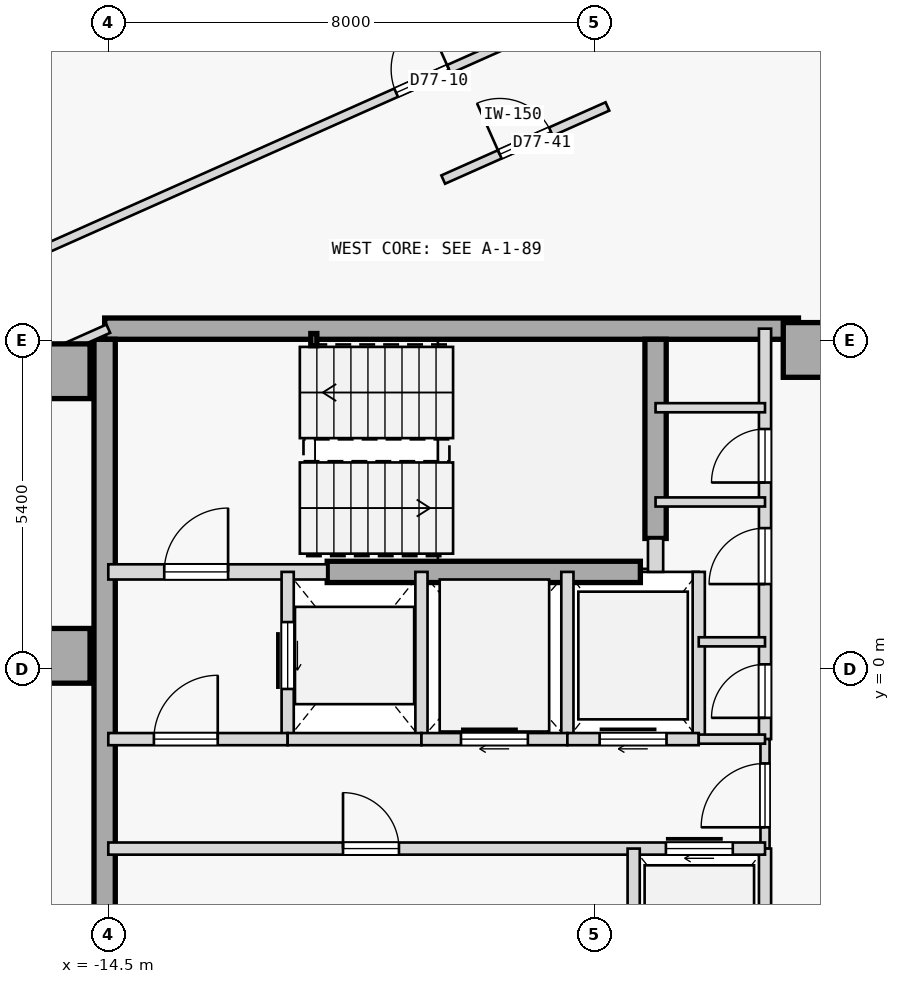
"""IFC4 building model, lengths in metres.
Left out: names, types, materials, properties, quantities, classifications, styles, units other than length and angle.
Written with IfcOpenShell. Run it as: python <this file> out.ifc"""

import sys

from ifc_helpers import new_model, si_unit, direction, frame, frame_2d, origin, origin_2d, place, context, subcontext, project, spatial, rectangle, hollow_rectangle, extrude, element, fill, save


model = new_model("IFC4")
c1 = context("Model", 3, precision=1e-05, world=origin(), true_north=direction((0.0, 1.0)))
c2 = subcontext(c1, "Body", "Model", "MODEL_VIEW")
j1 = project(units=[si_unit("LENGTHUNIT", "METRE"), si_unit("PLANEANGLEUNIT", "RADIAN")], contexts=[c1])
p1 = place(None, origin())
s1 = spatial("IfcSite", under=j1, at=p1, CompositionType="ELEMENT")
p2 = place(p1, origin())
s2 = spatial("IfcBuilding", under=s1, at=p2, CompositionType="ELEMENT")
p3 = place(p2, frame((0.0, 0.0, 288.6)))
s3 = spatial("IfcBuildingStorey", under=s2, at=p3, CompositionType="ELEMENT", Elevation=288.6)
for number, where, z_axis, x_axis in (
    (1, (-15.25, 4.9, 0.0), (0.0, 0.0, 1.0), (1.0, 0.0, 0.0)),
    (2, (-15.25, 0.22, 0.0), (0.0, 0.0, 1.0), (1.0, 0.0, 0.0)),
    (3, (-2.95, 5.25, 0.0), (0.0, 0.0, 1.0), (1.0, 0.0, 0.0)),
):
    element("IfcColumn", number, at=place(p3, frame(where, z_axis=z_axis, x_axis=x_axis)), inside=s3, PredefinedType="COLUMN", context=c2, shape_type="SweptSolid", body=[
        extrude(rectangle(XDim=0.9, YDim=0.9, at=origin_2d()), origin(), (0.0, 0.0, 1.0), 3.35),
    ])
p4 = place(p3, frame((-14.56, 5.6, 0.0), z_axis=(0.0, 0.0, 1.0), x_axis=(1.0, 0.0, 0.0)))
e4 = element("IfcWall", 4, at=p4, inside=s3, PredefinedType="SHEAR", context=c2, shape_type="SweptSolid", body=[
    extrude(rectangle(XDim=11.41, YDim=0.35, at=frame_2d((5.705, 0.0))), origin(), (0.0, 0.0, 1.0), 3.125),
])
p5 = place(p3, frame((-14.56, -5.425, 0.0), z_axis=(0.0, 0.0, 1.0), x_axis=(0.0, 1.0, 0.0)))
e5 = element("IfcWall", 5, at=p5, inside=s3, PredefinedType="SHEAR", context=c2, shape_type="SweptSolid", body=[
    extrude(rectangle(XDim=10.85, YDim=0.35, at=frame_2d((5.425, 0.0))), origin(), (0.0, 0.0, 1.0), 3.125),
])
p6 = place(p3, frame((-5.5, 2.15, 0.0), z_axis=(0.0, 0.0, 1.0), x_axis=(0.0, 1.0, 0.0)))
e6 = element("IfcWall", 6, at=p6, inside=s3, PredefinedType="SHEAR", context=c2, shape_type="SweptSolid", body=[
    extrude(rectangle(XDim=3.275, YDim=0.35, at=frame_2d((1.638, 0.0))), origin(), (0.0, 0.0, 1.0), 3.125),
])
p7 = place(p3, frame((-10.9, 1.6, 0.0), z_axis=(0.0, 0.0, 1.0), x_axis=(1.0, 0.0, 0.0)))
e7 = element("IfcWall", 7, at=p7, inside=s3, PredefinedType="SHEAR", context=c2, shape_type="SweptSolid", body=[
    extrude(rectangle(XDim=5.15, YDim=0.35, at=frame_2d((2.575, 0.0))), origin(), (0.0, 0.0, 1.0), 3.125),
])
p8 = place(p3, frame((-11.12, 5.42, 0.0), z_axis=(0.0, 0.0, 1.0), x_axis=(1.0, 0.0, 0.0)))
e8 = element("IfcColumn", 8, at=p8, inside=s3, PredefinedType="COLUMN", context=c2, shape_type="SweptSolid", body=[
    extrude(hollow_rectangle(XDim=0.1, YDim=0.2, WallThickness=0.008, at=origin_2d()), origin(), (0.0, 0.0, 1.0), 3.35),
])
p9 = place(p3, frame((-14.5, 1.6, 0.0), z_axis=(0.0, 0.0, 1.0), x_axis=(1.0, 0.0, 0.0)))
e9 = element("IfcWall", 9, at=p9, inside=s3, PredefinedType="STANDARD", context=c2, shape_type="SweptSolid", body=[
    extrude(rectangle(XDim=3.6, YDim=0.25, at=frame_2d((1.8, 0.0))), origin(), (0.0, 0.0, 1.0), 3.125),
])
p10 = place(p9, frame((0.92, 0.0, 0.0)))
e10 = element("IfcOpeningElement", 10, at=p10, cuts=e9, PredefinedType="OPENING", context=c2, shape_type="SweptSolid", body=[
    extrude(rectangle(XDim=1.05, YDim=2.15, at=frame_2d((0.525, 1.075))), frame((0.0, 0.135, 0.0), z_axis=(0.0, -1.0, 0.0), x_axis=(1.0, 0.0, 0.0)), (0.0, 0.0, 1.0), 0.27),
])
p11 = place(p3, frame((-5.5, 1.6, 0.0), z_axis=(0.0, 0.0, 1.0), x_axis=(0.0, 1.0, 0.0)))
e11 = element("IfcWall", 11, at=p11, inside=s3, PredefinedType="STANDARD", context=c2, shape_type="SweptSolid", body=[
    extrude(rectangle(XDim=0.55, YDim=0.25, at=frame_2d((0.275, 0.0))), origin(), (0.0, 0.0, 1.0), 3.125),
])
p12 = place(p3, frame((-3.7, -1.15, 0.0), z_axis=(0.0, 0.0, 1.0), x_axis=(0.0, 1.0, 0.0)))
e12 = element("IfcWall", 12, at=p12, inside=s3, PredefinedType="STANDARD", context=c2, shape_type="SweptSolid", body=[
    extrude(rectangle(XDim=6.75, YDim=0.2, at=frame_2d((3.375, 0.0))), origin(), (0.0, 0.0, 1.0), 3.125),
])
p13 = place(p12, frame((0.35, 0.0, 0.0)))
e13 = element("IfcOpeningElement", 13, at=p13, cuts=e12, PredefinedType="OPENING", context=c2, shape_type="SweptSolid", body=[
    extrude(rectangle(XDim=0.88, YDim=2.15, at=frame_2d((0.44, 1.075))), frame((0.0, 0.11, 0.0), z_axis=(0.0, -1.0, 0.0), x_axis=(1.0, 0.0, 0.0)), (0.0, 0.0, 1.0), 0.22),
])
p14 = place(p12, frame((2.55, 0.0, 0.0)))
e14 = element("IfcOpeningElement", 14, at=p14, cuts=e12, PredefinedType="OPENING", context=c2, shape_type="SweptSolid", body=[
    extrude(rectangle(XDim=0.92, YDim=2.15, at=frame_2d((0.46, 1.075))), frame((0.0, 0.11, 0.0), z_axis=(0.0, -1.0, 0.0), x_axis=(1.0, 0.0, 0.0)), (0.0, 0.0, 1.0), 0.22),
])
p15 = place(p12, frame((4.22, 0.0, 0.0)))
e15 = element("IfcOpeningElement", 15, at=p15, cuts=e12, PredefinedType="OPENING", context=c2, shape_type="SweptSolid", body=[
    extrude(rectangle(XDim=0.88, YDim=2.15, at=frame_2d((0.44, 1.075))), frame((0.0, 0.11, 0.0), z_axis=(0.0, -1.0, 0.0), x_axis=(1.0, 0.0, 0.0)), (0.0, 0.0, 1.0), 0.22),
])
p16 = place(p3, frame((-3.7, -2.95, 0.0), z_axis=(0.0, 0.0, 1.0), x_axis=(0.0, 1.0, 0.0)))
e16 = element("IfcWall", 16, at=p16, inside=s3, PredefinedType="PARTITIONING", context=c2, shape_type="SweptSolid", body=[
    extrude(rectangle(XDim=1.8, YDim=0.15, at=frame_2d((0.9, 0.0))), origin(), (0.0, 0.0, 1.0), 3.125),
])
p17 = place(p16, frame((0.35, 0.0, 0.0)))
e17 = element("IfcOpeningElement", 17, at=p17, cuts=e16, PredefinedType="OPENING", context=c2, shape_type="SweptSolid", body=[
    extrude(rectangle(XDim=1.05, YDim=2.18, at=frame_2d((0.525, 1.09))), frame((0.0, 0.085, 0.0), z_axis=(0.0, -1.0, 0.0), x_axis=(1.0, 0.0, 0.0)), (0.0, 0.0, 1.0), 0.17),
])
p18 = place(p3, frame((-3.7, -5.6, 0.0), z_axis=(0.0, 0.0, 1.0), x_axis=(0.0, 1.0, 0.0)))
e18 = element("IfcWall", 18, at=p18, inside=s3, PredefinedType="STANDARD", context=c2, shape_type="SweptSolid", body=[
    extrude(rectangle(XDim=2.65, YDim=0.2, at=frame_2d((1.325, 0.0))), origin(), (0.0, 0.0, 1.0), 3.125),
])
p19 = place(p3, frame((-11.55, -1.15, 0.0), z_axis=(0.0, 0.0, 1.0), x_axis=(0.0, 1.0, 0.0)))
e19 = element("IfcWall", 19, at=p19, inside=s3, PredefinedType="STANDARD", context=c2, shape_type="SweptSolid", body=[
    extrude(rectangle(XDim=2.75, YDim=0.2, at=frame_2d((1.375, 0.0))), origin(), (0.0, 0.0, 1.0), 3.125),
])
p20 = place(p19, frame((0.825, 0.0, 0.0)))
e20 = element("IfcOpeningElement", 20, at=p20, cuts=e19, PredefinedType="OPENING", context=c2, shape_type="SweptSolid", body=[
    extrude(rectangle(XDim=1.1, YDim=2.15, at=frame_2d((0.55, 1.075))), frame((0.0, 0.11, 0.0), z_axis=(0.0, -1.0, 0.0), x_axis=(1.0, 0.0, 0.0)), (0.0, 0.0, 1.0), 0.22),
])
p21 = place(p3, frame((-9.35, -1.15, 0.0), z_axis=(0.0, 0.0, 1.0), x_axis=(0.0, 1.0, 0.0)))
e21 = element("IfcWall", 21, at=p21, inside=s3, PredefinedType="STANDARD", context=c2, shape_type="SweptSolid", body=[
    extrude(rectangle(XDim=2.75, YDim=0.2, at=frame_2d((1.375, 0.0))), origin(), (0.0, 0.0, 1.0), 3.125),
])
p22 = place(p3, frame((-14.5, -1.15, 0.0), z_axis=(0.0, 0.0, 1.0), x_axis=(1.0, 0.0, 0.0)))
e22 = element("IfcWall", 22, at=p22, inside=s3, PredefinedType="STANDARD", context=c2, shape_type="SweptSolid", body=[
    extrude(rectangle(XDim=2.95, YDim=0.2, at=frame_2d((1.475, 0.0))), origin(), (0.0, 0.0, 1.0), 3.125),
])
p23 = place(p22, frame((0.75, 0.0, 0.0)))
e23 = element("IfcOpeningElement", 23, at=p23, cuts=e22, PredefinedType="OPENING", context=c2, shape_type="SweptSolid", body=[
    extrude(rectangle(XDim=1.05, YDim=2.18, at=frame_2d((0.525, 1.09))), frame((0.0, 0.11, 0.0), z_axis=(0.0, -1.0, 0.0), x_axis=(1.0, 0.0, 0.0)), (0.0, 0.0, 1.0), 0.22),
])
p24 = place(p3, frame((-11.55, -1.15, 0.0), z_axis=(0.0, 0.0, 1.0), x_axis=(1.0, 0.0, 0.0)))
e24 = element("IfcWall", 24, at=p24, inside=s3, PredefinedType="STANDARD", context=c2, shape_type="SweptSolid", body=[
    extrude(rectangle(XDim=2.2, YDim=0.2, at=frame_2d((1.1, 0.0))), origin(), (0.0, 0.0, 1.0), 3.125),
])
p25 = place(p3, frame((-6.95, -1.15, 0.0), z_axis=(0.0, 0.0, 1.0), x_axis=(0.0, 1.0, 0.0)))
e25 = element("IfcWall", 25, at=p25, inside=s3, PredefinedType="STANDARD", context=c2, shape_type="SweptSolid", body=[
    extrude(rectangle(XDim=2.75, YDim=0.2, at=frame_2d((1.375, 0.0))), origin(), (0.0, 0.0, 1.0), 3.125),
])
p26 = place(p3, frame((-9.35, -1.15, 0.0), z_axis=(0.0, 0.0, 1.0), x_axis=(1.0, 0.0, 0.0)))
e26 = element("IfcWall", 26, at=p26, inside=s3, PredefinedType="STANDARD", context=c2, shape_type="SweptSolid", body=[
    extrude(rectangle(XDim=2.4, YDim=0.2, at=frame_2d((1.2, 0.0))), origin(), (0.0, 0.0, 1.0), 3.125),
])
p27 = place(p26, frame((0.65, 0.0, 0.0)))
e27 = element("IfcOpeningElement", 27, at=p27, cuts=e26, PredefinedType="OPENING", context=c2, shape_type="SweptSolid", body=[
    extrude(rectangle(XDim=1.1, YDim=2.15, at=frame_2d((0.55, 1.075))), frame((0.0, 0.11, 0.0), z_axis=(0.0, -1.0, 0.0), x_axis=(1.0, 0.0, 0.0)), (0.0, 0.0, 1.0), 0.22),
])
p28 = place(p3, frame((-4.79, -1.15, 0.0), z_axis=(0.0, 0.0, 1.0), x_axis=(0.0, 1.0, 0.0)))
e28 = element("IfcWall", 28, at=p28, inside=s3, PredefinedType="STANDARD", context=c2, shape_type="SweptSolid", body=[
    extrude(rectangle(XDim=2.75, YDim=0.2, at=frame_2d((1.375, 0.0))), origin(), (0.0, 0.0, 1.0), 3.125),
])
p29 = place(p3, frame((-6.95, -1.15, 0.0), z_axis=(0.0, 0.0, 1.0), x_axis=(1.0, 0.0, 0.0)))
e29 = element("IfcWall", 29, at=p29, inside=s3, PredefinedType="STANDARD", context=c2, shape_type="SweptSolid", body=[
    extrude(rectangle(XDim=2.16, YDim=0.2, at=frame_2d((1.08, 0.0))), origin(), (0.0, 0.0, 1.0), 3.125),
])
p30 = place(p29, frame((0.53, 0.0, 0.0)))
e30 = element("IfcOpeningElement", 30, at=p30, cuts=e29, PredefinedType="OPENING", context=c2, shape_type="SweptSolid", body=[
    extrude(rectangle(XDim=1.1, YDim=2.15, at=frame_2d((0.55, 1.075))), frame((0.0, 0.11, 0.0), z_axis=(0.0, -1.0, 0.0), x_axis=(1.0, 0.0, 0.0)), (0.0, 0.0, 1.0), 0.22),
])
p31 = place(p3, frame((-4.79, -1.15, 0.0), z_axis=(0.0, 0.0, 1.0), x_axis=(1.0, 0.0, 0.0)))
e31 = element("IfcWall", 31, at=p31, inside=s3, PredefinedType="PARTITIONING", context=c2, shape_type="SweptSolid", body=[
    extrude(rectangle(XDim=1.09, YDim=0.15, at=frame_2d((0.545, 0.0))), origin(), (0.0, 0.0, 1.0), 3.125),
])
p32 = place(p3, frame((-14.5, -2.95, 0.0), z_axis=(0.0, 0.0, 1.0), x_axis=(1.0, 0.0, 0.0)))
e32 = element("IfcWall", 32, at=p32, inside=s3, PredefinedType="STANDARD", context=c2, shape_type="SweptSolid", body=[
    extrude(rectangle(XDim=10.8, YDim=0.2, at=frame_2d((5.4, 0.0))), origin(), (0.0, 0.0, 1.0), 3.125),
])
p33 = place(p32, frame((9.17, 0.0, 0.0)))
e33 = element("IfcOpeningElement", 33, at=p33, cuts=e32, PredefinedType="OPENING", context=c2, shape_type="SweptSolid", body=[
    extrude(rectangle(XDim=1.1, YDim=2.15, at=frame_2d((0.55, 1.075))), frame((0.0, 0.11, 0.0), z_axis=(0.0, -1.0, 0.0), x_axis=(1.0, 0.0, 0.0)), (0.0, 0.0, 1.0), 0.22),
])
p34 = place(p32, frame((3.86, 0.0, 0.0)))
e34 = element("IfcOpeningElement", 34, at=p34, cuts=e32, PredefinedType="OPENING", context=c2, shape_type="SweptSolid", body=[
    extrude(rectangle(XDim=0.92, YDim=2.15, at=frame_2d((0.46, 1.075))), frame((0.0, 0.11, 0.0), z_axis=(0.0, -1.0, 0.0), x_axis=(1.0, 0.0, 0.0)), (0.0, 0.0, 1.0), 0.22),
])
p35 = place(p3, frame((-5.86, -5.6, 0.0), z_axis=(0.0, 0.0, 1.0), x_axis=(0.0, 1.0, 0.0)))
e35 = element("IfcWall", 35, at=p35, inside=s3, PredefinedType="STANDARD", context=c2, shape_type="SweptSolid", body=[
    extrude(rectangle(XDim=2.65, YDim=0.2, at=frame_2d((1.325, 0.0))), origin(), (0.0, 0.0, 1.0), 3.125),
])
p36 = place(p3, frame((-5.5, 4.3, 0.0), z_axis=(0.0, 0.0, 1.0), x_axis=(1.0, 0.0, 0.0)))
e36 = element("IfcWall", 36, at=p36, inside=s3, PredefinedType="PARTITIONING", context=c2, shape_type="SweptSolid", body=[
    extrude(rectangle(XDim=1.8, YDim=0.15, at=frame_2d((0.9, 0.0))), origin(), (0.0, 0.0, 1.0), 3.125),
])
p37 = place(p3, frame((-4.79, 0.45, 0.0), z_axis=(0.0, 0.0, 1.0), x_axis=(1.0, 0.0, 0.0)))
e37 = element("IfcWall", 37, at=p37, inside=s3, PredefinedType="PARTITIONING", context=c2, shape_type="SweptSolid", body=[
    extrude(rectangle(XDim=1.09, YDim=0.15, at=frame_2d((0.545, 0.0))), origin(), (0.0, 0.0, 1.0), 3.125),
])
p38 = place(p3, frame((-5.5, 2.75, 0.0), z_axis=(0.0, 0.0, 1.0), x_axis=(1.0, 0.0, 0.0)))
e38 = element("IfcWall", 38, at=p38, inside=s3, PredefinedType="PARTITIONING", context=c2, shape_type="SweptSolid", body=[
    extrude(rectangle(XDim=1.8, YDim=0.15, at=frame_2d((0.9, 0.0))), origin(), (0.0, 0.0, 1.0), 3.125),
])
p39 = place(p3, frame((-17.499, 6.038, 0.0), z_axis=(0.0, 0.0, 1.0), x_axis=(0.913541623157, 0.406745255362, 0.0)))
e39 = element("IfcWall", 39, at=p39, inside=s3, PredefinedType="PARTITIONING", context=c2, shape_type="SweptSolid", body=[
    extrude(rectangle(XDim=17.879, YDim=0.15, at=frame_2d((8.939, 0.0))), origin(), (0.0, 0.0, 1.0), 3.125),
])
p40 = place(p39, frame((8.465, 0.0, 0.0)))
e40 = element("IfcOpeningElement", 40, at=p40, cuts=e39, PredefinedType="OPENING", context=c2, shape_type="SweptSolid", body=[
    extrude(rectangle(XDim=0.95, YDim=2.15, at=frame_2d((0.475, 1.075))), frame((0.0, 0.085, 0.0), z_axis=(0.0, -1.0, 0.0), x_axis=(1.0, 0.0, 0.0)), (0.0, 0.0, 1.0), 0.17),
])
p41 = place(p3, frame((-18.661, 3.747, 0.0), z_axis=(0.0, 0.0, 1.0), x_axis=(0.913535055583, 0.40676000568, 0.0)))
e41 = element("IfcWall", 41, at=p41, inside=s3, PredefinedType="PARTITIONING", context=c2, shape_type="SweptSolid", body=[
    extrude(rectangle(XDim=4.555, YDim=0.15, at=frame_2d((2.277, 0.0))), origin(), (0.0, 0.0, 1.0), 3.125),
])
p42 = place(p41, frame((1.134, 0.0, 0.0)))
e42 = element("IfcOpeningElement", 42, at=p42, cuts=e41, PredefinedType="OPENING", context=c2, shape_type="SweptSolid", body=[
    extrude(rectangle(XDim=0.92, YDim=2.15, at=frame_2d((0.46, 1.075))), frame((0.0, 0.085, 0.0), z_axis=(0.0, -1.0, 0.0), x_axis=(1.0, 0.0, 0.0)), (0.0, 0.0, 1.0), 0.17),
])
p43 = place(p3, frame((-8.992, 8.052, 0.0), z_axis=(0.0, 0.0, 1.0), x_axis=(0.913535467925, 0.406759079607, 0.0)))
e43 = element("IfcWall", 43, at=p43, inside=s3, PredefinedType="PARTITIONING", context=c2, shape_type="SweptSolid", body=[
    extrude(rectangle(XDim=2.956, YDim=0.15, at=frame_2d((1.478, 0.0))), origin(), (0.0, 0.0, 1.0), 3.125),
])
p44 = place(p43, frame((1.018, 0.0, 0.0)))
e44 = element("IfcOpeningElement", 44, at=p44, cuts=e43, PredefinedType="OPENING", context=c2, shape_type="SweptSolid", body=[
    extrude(rectangle(XDim=0.92, YDim=2.15, at=frame_2d((0.46, 1.075))), frame((0.0, 0.085, 0.0), z_axis=(0.0, -1.0, 0.0), x_axis=(1.0, 0.0, 0.0)), (0.0, 0.0, 1.0), 0.17),
])
p45 = place(p10, origin())
e45 = element("IfcDoor", 45, at=p45, inside=s3, OperationType="SINGLE_SWING_RIGHT", PredefinedType="DOOR", context=c2, shape_type="SweptSolid", body=[
    extrude(rectangle(XDim=1.05, YDim=2.15, at=frame_2d((0.525, 1.075))), frame((0.0, 0.025, 0.0), z_axis=(0.0, -1.0, 0.0), x_axis=(1.0, 0.0, 0.0)), (0.0, 0.0, 1.0), 0.05),
])
fill(e10, e45)
p46 = place(p23, origin())
e46 = element("IfcDoor", 46, at=p46, inside=s3, OperationType="SINGLE_SWING_RIGHT", PredefinedType="DOOR", context=c2, shape_type="SweptSolid", body=[
    extrude(rectangle(XDim=1.05, YDim=2.18, at=frame_2d((0.525, 1.09))), frame((0.0, 0.025, 0.0), z_axis=(0.0, -1.0, 0.0), x_axis=(1.0, 0.0, 0.0)), (0.0, 0.0, 1.0), 0.05),
])
fill(e23, e46)
p47 = place(p17, origin())
e47 = element("IfcDoor", 47, at=p47, inside=s3, OperationType="SINGLE_SWING_LEFT", PredefinedType="DOOR", context=c2, shape_type="SweptSolid", body=[
    extrude(rectangle(XDim=1.05, YDim=2.18, at=frame_2d((0.525, 1.09))), frame((0.0, 0.025, 0.0), z_axis=(0.0, -1.0, 0.0), x_axis=(1.0, 0.0, 0.0)), (0.0, 0.0, 1.0), 0.05),
])
fill(e17, e47)
p48 = place(p20, origin())
e48 = element("IfcDoor", 48, at=p48, inside=s3, OperationType="SLIDING_TO_RIGHT", PredefinedType="DOOR", context=c2, shape_type="SweptSolid", body=[
    extrude(rectangle(XDim=1.1, YDim=2.15, at=frame_2d((0.55, 1.075))), frame((0.0, 0.025, 0.0), z_axis=(0.0, -1.0, 0.0), x_axis=(1.0, 0.0, 0.0)), (0.0, 0.0, 1.0), 0.05),
])
fill(e20, e48)
p49 = place(p27, origin())
e49 = element("IfcDoor", 49, at=p49, inside=s3, OperationType="SLIDING_TO_RIGHT", PredefinedType="DOOR", context=c2, shape_type="SweptSolid", body=[
    extrude(rectangle(XDim=1.1, YDim=2.15, at=frame_2d((0.55, 1.075))), frame((0.0, 0.025, 0.0), z_axis=(0.0, -1.0, 0.0), x_axis=(1.0, 0.0, 0.0)), (0.0, 0.0, 1.0), 0.05),
])
fill(e27, e49)
p50 = place(p30, origin())
e50 = element("IfcDoor", 50, at=p50, inside=s3, OperationType="SLIDING_TO_RIGHT", PredefinedType="DOOR", context=c2, shape_type="SweptSolid", body=[
    extrude(rectangle(XDim=1.1, YDim=2.15, at=frame_2d((0.55, 1.075))), frame((0.0, 0.025, 0.0), z_axis=(0.0, -1.0, 0.0), x_axis=(1.0, 0.0, 0.0)), (0.0, 0.0, 1.0), 0.05),
])
fill(e30, e50)
p51 = place(p33, origin())
e51 = element("IfcDoor", 51, at=p51, inside=s3, OperationType="SLIDING_TO_RIGHT", PredefinedType="DOOR", context=c2, shape_type="SweptSolid", body=[
    extrude(rectangle(XDim=1.1, YDim=2.15, at=frame_2d((0.55, 1.075))), frame((0.0, 0.025, 0.0), z_axis=(0.0, -1.0, 0.0), x_axis=(1.0, 0.0, 0.0)), (0.0, 0.0, 1.0), 0.05),
])
fill(e33, e51)
p52 = place(p34, origin())
e52 = element("IfcDoor", 52, at=p52, inside=s3, OperationType="SINGLE_SWING_LEFT", PredefinedType="DOOR", context=c2, shape_type="SweptSolid", body=[
    extrude(rectangle(XDim=0.92, YDim=2.15, at=frame_2d((0.46, 1.075))), frame((0.0, 0.025, 0.0), z_axis=(0.0, -1.0, 0.0), x_axis=(1.0, 0.0, 0.0)), (0.0, 0.0, 1.0), 0.05),
])
fill(e34, e52)
p53 = place(p13, origin())
e53 = element("IfcDoor", 53, at=p53, inside=s3, OperationType="SINGLE_SWING_LEFT", PredefinedType="DOOR", context=c2, shape_type="SweptSolid", body=[
    extrude(rectangle(XDim=0.88, YDim=2.15, at=frame_2d((0.44, 1.075))), frame((0.0, 0.025, 0.0), z_axis=(0.0, -1.0, 0.0), x_axis=(1.0, 0.0, 0.0)), (0.0, 0.0, 1.0), 0.05),
])
fill(e13, e53)
p54 = place(p14, origin())
e54 = element("IfcDoor", 54, at=p54, inside=s3, OperationType="SINGLE_SWING_LEFT", PredefinedType="DOOR", context=c2, shape_type="SweptSolid", body=[
    extrude(rectangle(XDim=0.92, YDim=2.15, at=frame_2d((0.46, 1.075))), frame((0.0, 0.025, 0.0), z_axis=(0.0, -1.0, 0.0), x_axis=(1.0, 0.0, 0.0)), (0.0, 0.0, 1.0), 0.05),
])
fill(e14, e54)
p55 = place(p15, origin())
e55 = element("IfcDoor", 55, at=p55, inside=s3, OperationType="SINGLE_SWING_LEFT", PredefinedType="DOOR", context=c2, shape_type="SweptSolid", body=[
    extrude(rectangle(XDim=0.88, YDim=2.15, at=frame_2d((0.44, 1.075))), frame((0.0, 0.025, 0.0), z_axis=(0.0, -1.0, 0.0), x_axis=(1.0, 0.0, 0.0)), (0.0, 0.0, 1.0), 0.05),
])
fill(e15, e55)
p56 = place(p40, origin())
e56 = element("IfcDoor", 56, at=p56, inside=s3, OperationType="SINGLE_SWING_RIGHT", PredefinedType="DOOR", context=c2, shape_type="SweptSolid", body=[
    extrude(rectangle(XDim=0.95, YDim=2.15, at=frame_2d((0.475, 1.075))), frame((0.0, 0.025, 0.0), z_axis=(0.0, -1.0, 0.0), x_axis=(1.0, 0.0, 0.0)), (0.0, 0.0, 1.0), 0.05),
])
fill(e40, e56)
p57 = place(p44, origin())
e57 = element("IfcDoor", 57, at=p57, inside=s3, OperationType="SINGLE_SWING_LEFT", PredefinedType="DOOR", context=c2, shape_type="SweptSolid", body=[
    extrude(rectangle(XDim=0.92, YDim=2.15, at=frame_2d((0.46, 1.075))), frame((0.0, 0.025, 0.0), z_axis=(0.0, -1.0, 0.0), x_axis=(1.0, 0.0, 0.0)), (0.0, 0.0, 1.0), 0.05),
])
fill(e44, e57)
save(model, sys.argv[1])
